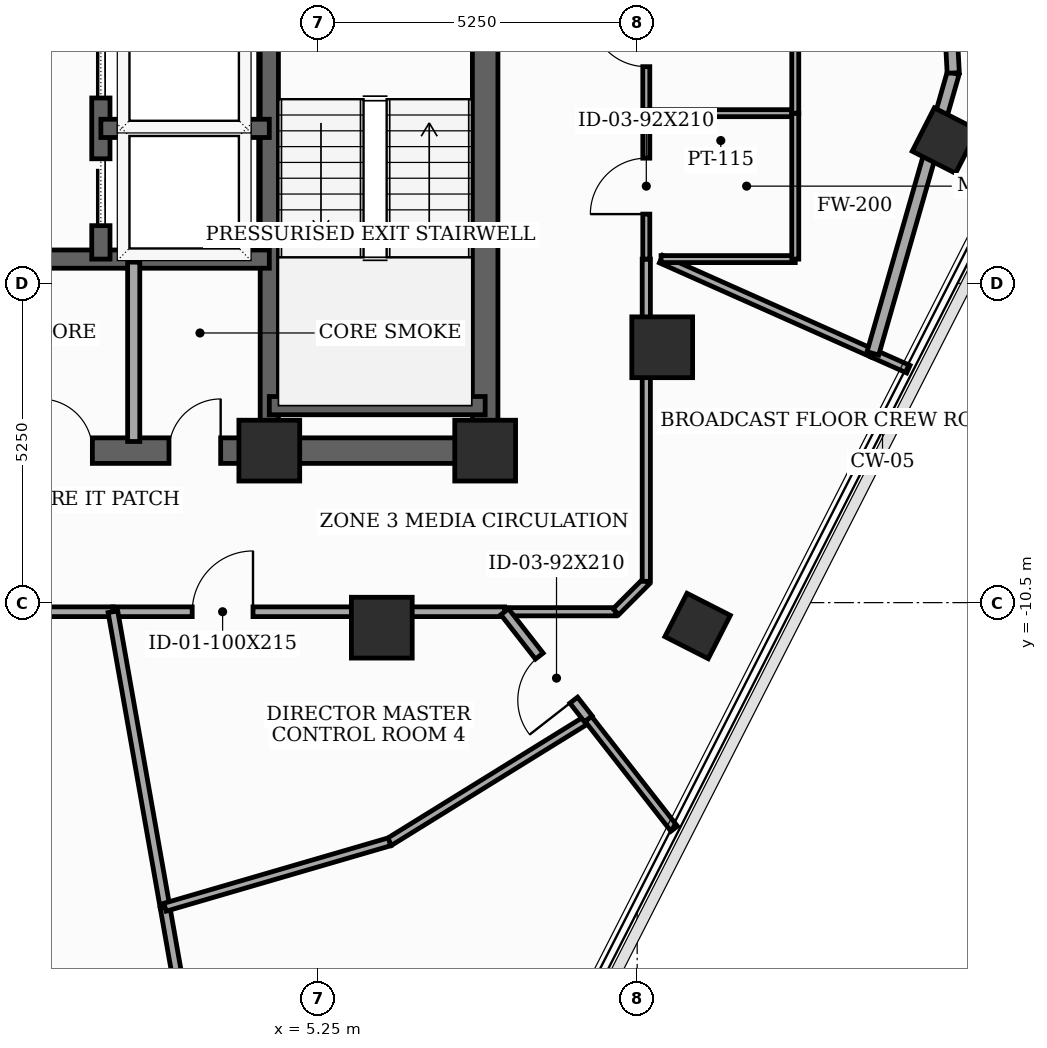
"""IFC4 building model, lengths in metres.
Left out: names, types, materials, properties, quantities, classifications, styles, units other than length and angle.
Written with IfcOpenShell. Run it as: python <this file> out.ifc"""

import sys

from ifc_helpers import new_model, si_unit, direction, frame, frame_2d, origin, origin_2d, place, context, subcontext, project, spatial, rectangle, extrude, element, fill, save


model = new_model("IFC4")
c1 = context("Model", 3, precision=1e-05, world=origin(), true_north=direction((0.0, 1.0)))
c2 = subcontext(c1, "Body", "Model", "MODEL_VIEW")
j1 = project(units=[si_unit("LENGTHUNIT", "METRE"), si_unit("PLANEANGLEUNIT", "RADIAN")], contexts=[c1])
p1 = place(None, origin())
s1 = spatial("IfcSite", under=j1, at=p1, CompositionType="ELEMENT")
p2 = place(p1, origin())
s2 = spatial("IfcBuilding", under=s1, at=p2, CompositionType="ELEMENT")
p3 = place(p2, frame((0.0, 0.0, 270.7)))
s3 = spatial("IfcBuildingStorey", under=s2, at=p3, CompositionType="ELEMENT", Elevation=270.7)
for number, where, z_axis, x_axis in (
    (1, (4.45, -8.0, 0.0), (0.0, 0.0, 1.0), (1.0, 0.0, 0.0)),
    (2, (8.0, -8.0, 0.0), (0.0, 0.0, 1.0), (1.0, 0.0, 0.0)),
    (3, (6.3, -10.912, 0.0), (0.0, 0.0, 1.0), (1.0, 0.0, 0.0)),
    (4, (10.912, -6.3, 0.0), (0.0, 0.0, 1.0), (1.0, 0.0, 0.0)),
):
    element("IfcColumn", number, at=place(p3, frame(where, z_axis=z_axis, x_axis=x_axis)), inside=s3, PredefinedType="COLUMN", context=c2, shape_type="SweptSolid", body=[
        extrude(rectangle(XDim=1.0, YDim=1.0, at=origin_2d()), origin(), (0.0, 0.0, 1.0), 3.7),
    ])
for number, where, z_axis, x_axis in (
    (5, (11.494, -10.885, 0.0), (0.0, 0.0, 1.0), (0.454, 0.891, 0.0)),
    (6, (15.562, -2.901, 0.0), (0.0, 0.0, 1.0), (0.454, 0.891, 0.0)),
):
    element("IfcColumn", number, at=place(p3, frame(where, z_axis=z_axis, x_axis=x_axis)), inside=s3, PredefinedType="COLUMN", context=c2, shape_type="SweptSolid", body=[
        extrude(rectangle(XDim=0.8, YDim=0.8, at=origin_2d()), origin(), (0.0, 0.0, 1.0), 3.7),
    ])
p4 = place(p3, frame((8.0, -8.0, 0.0), z_axis=(0.0, 0.0, 1.0), x_axis=(0.0, 1.0, 0.0)))
e7 = element("IfcWall", 7, at=p4, inside=s3, PredefinedType="SHEAR", context=c2, shape_type="SweptSolid", body=[
    extrude(rectangle(XDim=16.0, YDim=0.42, at=frame_2d((8.0, 0.0))), origin(), (0.0, 0.0, 1.0), 3.5),
])
p5 = place(p4, frame((9.6, 0.0, 0.0)))
e8 = element("IfcOpeningElement", 8, at=p5, cuts=e7, PredefinedType="OPENING", context=c2, shape_type="SweptSolid", body=[
    extrude(rectangle(XDim=1.05, YDim=2.15, at=frame_2d((0.525, 1.075))), frame((0.0, 0.22, 0.0), z_axis=(0.0, -1.0, 0.0), x_axis=(1.0, 0.0, 0.0)), (0.0, 0.0, 1.0), 0.44),
])
p6 = place(p4, frame((14.469, 0.0, 0.0)))
e9 = element("IfcOpeningElement", 9, at=p6, cuts=e7, PredefinedType="OPENING", context=c2, shape_type="SweptSolid", body=[
    extrude(rectangle(XDim=0.85, YDim=2.02, at=frame_2d((0.425, 1.01))), frame((0.0, 0.22, 0.0), z_axis=(0.0, -1.0, 0.0), x_axis=(1.0, 0.0, 0.0)), (0.0, 0.0, 1.0), 0.44),
])
p7 = place(p3, frame((-8.0, -8.0, 0.0), z_axis=(0.0, 0.0, 1.0), x_axis=(1.0, 0.0, 0.0)))
e10 = element("IfcWall", 10, at=p7, inside=s3, PredefinedType="SHEAR", context=c2, shape_type="SweptSolid", body=[
    extrude(rectangle(XDim=16.0, YDim=0.42, at=frame_2d((8.0, 0.0))), origin(), (0.0, 0.0, 1.0), 3.5),
])
p8 = place(p7, frame((4.35, 0.0, 0.0)))
e11 = element("IfcOpeningElement", 11, at=p8, cuts=e10, PredefinedType="OPENING", context=c2, shape_type="SweptSolid", body=[
    extrude(rectangle(XDim=0.85, YDim=2.02, at=frame_2d((0.425, 1.01))), frame((0.0, 0.22, 0.0), z_axis=(0.0, -1.0, 0.0), x_axis=(1.0, 0.0, 0.0)), (0.0, 0.0, 1.0), 0.44),
])
p9 = place(p7, frame((6.49, 0.0, 0.0)))
e12 = element("IfcOpeningElement", 12, at=p9, cuts=e10, PredefinedType="OPENING", context=c2, shape_type="SweptSolid", body=[
    extrude(rectangle(XDim=0.85, YDim=2.02, at=frame_2d((0.425, 1.01))), frame((0.0, 0.22, 0.0), z_axis=(0.0, -1.0, 0.0), x_axis=(1.0, 0.0, 0.0)), (0.0, 0.0, 1.0), 0.44),
])
p10 = place(p7, frame((8.69, 0.0, 0.0)))
e13 = element("IfcOpeningElement", 13, at=p10, cuts=e10, PredefinedType="OPENING", context=c2, shape_type="SweptSolid", body=[
    extrude(rectangle(XDim=0.85, YDim=2.02, at=frame_2d((0.425, 1.01))), frame((0.0, 0.22, 0.0), z_axis=(0.0, -1.0, 0.0), x_axis=(1.0, 0.0, 0.0)), (0.0, 0.0, 1.0), 0.44),
])
p11 = place(p7, frame((10.8, 0.0, 0.0)))
e14 = element("IfcOpeningElement", 14, at=p11, cuts=e10, PredefinedType="OPENING", context=c2, shape_type="SweptSolid", body=[
    extrude(rectangle(XDim=0.85, YDim=2.02, at=frame_2d((0.425, 1.01))), frame((0.0, 0.22, 0.0), z_axis=(0.0, -1.0, 0.0), x_axis=(1.0, 0.0, 0.0)), (0.0, 0.0, 1.0), 0.44),
])
p12 = place(p3, frame((4.45, -7.79, 0.0), z_axis=(0.0, 0.0, 1.0), x_axis=(0.0, 1.0, 0.0)))
e15 = element("IfcWall", 15, at=p12, inside=s3, PredefinedType="SHEAR", context=c2, shape_type="SweptSolid", body=[
    extrude(rectangle(XDim=15.58, YDim=0.3, at=frame_2d((7.79, 0.0))), origin(), (0.0, 0.0, 1.0), 3.5),
])
p13 = place(p3, frame((4.45, -7.26, 0.0), z_axis=(0.0, 0.0, 1.0), x_axis=(1.0, 0.0, 0.0)))
e16 = element("IfcWall", 16, at=p13, inside=s3, PredefinedType="SHEAR", context=c2, shape_type="SweptSolid", body=[
    extrude(rectangle(XDim=3.55, YDim=0.3, at=frame_2d((1.775, 0.0))), origin(), (0.0, 0.0, 1.0), 3.5),
])
p14 = place(p3, frame((-4.45, -4.85, 0.0), z_axis=(0.0, 0.0, 1.0), x_axis=(1.0, 0.0, 0.0)))
e17 = element("IfcWall", 17, at=p14, inside=s3, PredefinedType="SHEAR", context=c2, shape_type="SweptSolid", body=[
    extrude(rectangle(XDim=8.9, YDim=0.3, at=frame_2d((4.45, 0.0))), origin(), (0.0, 0.0, 1.0), 3.5),
])
p15 = place(p3, frame((1.68, -4.85, 0.0), z_axis=(0.0, 0.0, 1.0), x_axis=(0.0, 1.0, 0.0)))
e18 = element("IfcWall", 18, at=p15, inside=s3, PredefinedType="SHEAR", context=c2, shape_type="SweptSolid", body=[
    extrude(rectangle(XDim=12.64, YDim=0.3, at=frame_2d((6.32, 0.0))), origin(), (0.0, 0.0, 1.0), 3.5),
])
p16 = place(p15, frame((0.55, 0.0, 0.0)))
e19 = element("IfcOpeningElement", 19, at=p16, cuts=e18, PredefinedType="OPENING", context=c2, shape_type="SweptSolid", body=[
    extrude(rectangle(XDim=1.1, YDim=2.1, at=frame_2d((0.55, 1.05))), frame((0.0, 0.16, 0.0), z_axis=(0.0, -1.0, 0.0), x_axis=(1.0, 0.0, 0.0)), (0.0, 0.0, 1.0), 0.32),
])
p17 = place(p15, frame((2.65, 0.0, 0.0)))
e20 = element("IfcOpeningElement", 20, at=p17, cuts=e18, PredefinedType="OPENING", context=c2, shape_type="SweptSolid", body=[
    extrude(rectangle(XDim=1.1, YDim=2.1, at=frame_2d((0.55, 1.05))), frame((0.0, 0.16, 0.0), z_axis=(0.0, -1.0, 0.0), x_axis=(1.0, 0.0, 0.0)), (0.0, 0.0, 1.0), 0.32),
])
p18 = place(p15, frame((4.75, 0.0, 0.0)))
e21 = element("IfcOpeningElement", 21, at=p18, cuts=e18, PredefinedType="OPENING", context=c2, shape_type="SweptSolid", body=[
    extrude(rectangle(XDim=1.1, YDim=2.1, at=frame_2d((0.55, 1.05))), frame((0.0, 0.16, 0.0), z_axis=(0.0, -1.0, 0.0), x_axis=(1.0, 0.0, 0.0)), (0.0, 0.0, 1.0), 0.32),
])
p19 = place(p15, frame((8.9, 0.0, 0.0)))
e22 = element("IfcOpeningElement", 22, at=p19, cuts=e18, PredefinedType="OPENING", context=c2, shape_type="SweptSolid", body=[
    extrude(rectangle(XDim=0.95, YDim=2.1, at=frame_2d((0.475, 1.05))), frame((0.0, 0.16, 0.0), z_axis=(0.0, -1.0, 0.0), x_axis=(1.0, 0.0, 0.0)), (0.0, 0.0, 1.0), 0.32),
])
p20 = place(p3, frame((1.68, -2.7, 0.0), z_axis=(0.0, 0.0, 1.0), x_axis=(1.0, 0.0, 0.0)))
e23 = element("IfcWall", 23, at=p20, inside=s3, PredefinedType="SHEAR", context=c2, shape_type="SweptSolid", body=[
    extrude(rectangle(XDim=2.77, YDim=0.3, at=frame_2d((1.385, 0.0))), origin(), (0.0, 0.0, 1.0), 3.5),
])
p21 = place(p3, frame((2.22, -7.85, 0.0), z_axis=(0.0, 0.0, 1.0), x_axis=(0.0, 1.0, 0.0)))
e24 = element("IfcWall", 24, at=p21, inside=s3, PredefinedType="SOLIDWALL", context=c2, shape_type="SweptSolid", body=[
    extrude(rectangle(XDim=2.95, YDim=0.2, at=frame_2d((1.475, 0.0))), origin(), (0.0, 0.0, 1.0), 2.885),
])
p22 = place(p3, frame((-5.663, -10.65, 0.0), z_axis=(0.0, 0.0, 1.0), x_axis=(1.0, 0.0, 0.0)))
e25 = element("IfcWall", 25, at=p22, inside=s3, PredefinedType="PARTITIONING", context=c2, shape_type="SweptSolid", body=[
    extrude(rectangle(XDim=7.541, YDim=0.16, at=frame_2d((3.771, 0.0))), origin(), (0.0, 0.0, 1.0), 2.885),
])
p23 = place(p22, frame((3.271, 0.0, 0.0)))
e26 = element("IfcOpeningElement", 26, at=p23, cuts=e25, PredefinedType="OPENING", context=c2, shape_type="SweptSolid", body=[
    extrude(rectangle(XDim=1.0, YDim=2.15, at=frame_2d((0.5, 1.075))), frame((0.0, 0.09, 0.0), z_axis=(0.0, -1.0, 0.0), x_axis=(1.0, 0.0, 0.0)), (0.0, 0.0, 1.0), 0.18),
])
p24 = place(p3, frame((1.878, -10.65, 0.0), z_axis=(0.0, 0.0, 1.0), x_axis=(1.0, 0.0, 0.0)))
e27 = element("IfcWall", 27, at=p24, inside=s3, PredefinedType="PARTITIONING", context=c2, shape_type="SweptSolid", body=[
    extrude(rectangle(XDim=6.443, YDim=0.16, at=frame_2d((3.222, 0.0))), origin(), (0.0, 0.0, 1.0), 2.885),
])
p25 = place(p24, frame((1.304, 0.0, 0.0)))
e28 = element("IfcOpeningElement", 28, at=p25, cuts=e27, PredefinedType="OPENING", context=c2, shape_type="SweptSolid", body=[
    extrude(rectangle(XDim=1.0, YDim=2.15, at=frame_2d((0.5, 1.075))), frame((0.0, 0.09, 0.0), z_axis=(0.0, -1.0, 0.0), x_axis=(1.0, 0.0, 0.0)), (0.0, 0.0, 1.0), 0.18),
])
p26 = place(p3, frame((8.321, -10.65, 0.0), z_axis=(0.0, 0.0, 1.0), x_axis=(1.0, 0.0, 0.0)))
e29 = element("IfcWall", 29, at=p26, inside=s3, PredefinedType="PARTITIONING", context=c2, shape_type="SweptSolid", body=[
    extrude(rectangle(XDim=1.829, YDim=0.135, at=frame_2d((0.915, 0.0))), origin(), (0.0, 0.0, 1.0), 3.5),
])
p27 = place(p3, frame((10.15, -10.65, 0.0), z_axis=(0.0, 0.0, 1.0), x_axis=(0.707106781187, 0.707106781187, 0.0)))
e30 = element("IfcWall", 30, at=p27, inside=s3, PredefinedType="PARTITIONING", context=c2, shape_type="SweptSolid", body=[
    extrude(rectangle(XDim=0.707, YDim=0.135, at=frame_2d((0.354, 0.0))), origin(), (0.0, 0.0, 1.0), 3.5),
])
p28 = place(p3, frame((10.65, -10.15, 0.0), z_axis=(0.0, 0.0, 1.0), x_axis=(0.0, 1.0, 0.0)))
e31 = element("IfcWall", 31, at=p28, inside=s3, PredefinedType="PARTITIONING", context=c2, shape_type="SweptSolid", body=[
    extrude(rectangle(XDim=5.3, YDim=0.135, at=frame_2d((2.65, 0.0))), origin(), (0.0, 0.0, 1.0), 2.885),
])
p29 = place(p3, frame((10.65, -4.85, 0.0), z_axis=(0.0, 0.0, 1.0), x_axis=(0.0, 1.0, 0.0)))
e32 = element("IfcWall", 32, at=p29, inside=s3, PredefinedType="PARTITIONING", context=c2, shape_type="SweptSolid", body=[
    extrude(rectangle(XDim=2.4, YDim=0.115, at=frame_2d((1.2, 0.0))), origin(), (0.0, 0.0, 1.0), 3.5),
])
p30 = place(p29, frame((0.74, 0.0, 0.0)))
e33 = element("IfcOpeningElement", 33, at=p30, cuts=e32, PredefinedType="OPENING", context=c2, shape_type="SweptSolid", body=[
    extrude(rectangle(XDim=0.92, YDim=2.1, at=frame_2d((0.46, 1.05))), frame((0.0, 0.067, 0.0), z_axis=(0.0, -1.0, 0.0), x_axis=(1.0, 0.0, 0.0)), (0.0, 0.0, 1.0), 0.135),
])
p31 = place(p3, frame((10.65, -2.45, 0.0), z_axis=(0.0, 0.0, 1.0), x_axis=(0.0, 1.0, 0.0)))
e34 = element("IfcWall", 34, at=p31, inside=s3, PredefinedType="PARTITIONING", context=c2, shape_type="SweptSolid", body=[
    extrude(rectangle(XDim=2.45, YDim=0.115, at=frame_2d((1.225, 0.0))), origin(), (0.0, 0.0, 1.0), 2.885),
])
p32 = place(p31, frame((0.765, 0.0, 0.0)))
e35 = element("IfcOpeningElement", 35, at=p32, cuts=e34, PredefinedType="OPENING", context=c2, shape_type="SweptSolid", body=[
    extrude(rectangle(XDim=0.92, YDim=2.1, at=frame_2d((0.46, 1.05))), frame((0.0, 0.067, 0.0), z_axis=(0.0, -1.0, 0.0), x_axis=(1.0, 0.0, 0.0)), (0.0, 0.0, 1.0), 0.135),
])
p33 = place(p3, frame((4.719, -26.759, 0.0), z_axis=(0.0, 0.0, 1.0), x_axis=(-0.173635361328, 0.984810012793, 0.0)))
e36 = element("IfcWall", 36, at=p33, inside=s3, PredefinedType="PARTITIONING", context=c2, shape_type="SweptSolid", body=[
    extrude(rectangle(XDim=11.423, YDim=0.16, at=frame_2d((5.711, 0.0))), origin(), (0.0, 0.0, 1.0), 3.035),
])
p34 = place(p33, frame((5.251, 0.0, 0.0)))
e37 = element("IfcOpeningElement", 37, at=p34, cuts=e36, PredefinedType="OPENING", context=c2, shape_type="SweptSolid", body=[
    extrude(rectangle(XDim=0.92, YDim=2.1, at=frame_2d((0.46, 1.05))), frame((0.0, 0.09, 0.0), z_axis=(0.0, -1.0, 0.0), x_axis=(1.0, 0.0, 0.0)), (0.0, 0.0, 1.0), 0.18),
])
p35 = place(p3, frame((2.735, -15.51, 0.0), z_axis=(0.0, 0.0, 1.0), x_axis=(-0.173689381088, 0.984800486849, 0.0)))
e38 = element("IfcWall", 38, at=p35, inside=s3, PredefinedType="PARTITIONING", context=c2, shape_type="SweptSolid", body=[
    extrude(rectangle(XDim=4.935, YDim=0.16, at=frame_2d((2.468, 0.0))), origin(), (0.0, 0.0, 1.0), 2.885),
])
p36 = place(p3, frame((9.696, -12.411, 0.0), z_axis=(0.0, 0.0, 1.0), x_axis=(-0.850393663863, -0.526146953295, 0.0)))
e39 = element("IfcWall", 39, at=p36, inside=s3, PredefinedType="PARTITIONING", context=c2, shape_type="SweptSolid", body=[
    extrude(rectangle(XDim=3.845, YDim=0.135, at=frame_2d((1.923, 0.0))), origin(), (0.0, 0.0, 1.0), 3.035),
])
p37 = place(p3, frame((6.426, -14.434, 0.0), z_axis=(0.0, 0.0, 1.0), x_axis=(-0.960041241254, -0.279858562654, 0.0)))
e40 = element("IfcWall", 40, at=p37, inside=s3, PredefinedType="PARTITIONING", context=c2, shape_type="SweptSolid", body=[
    extrude(rectangle(XDim=3.844, YDim=0.135, at=frame_2d((1.922, 0.0))), origin(), (0.0, 0.0, 1.0), 3.185),
])
p38 = place(p3, frame((11.108, -14.218, 0.0), z_axis=(0.0, 0.0, 1.0), x_axis=(-0.615736984334, 0.787951753677, 0.0)))
e41 = element("IfcWall", 41, at=p38, inside=s3, PredefinedType="PARTITIONING", context=c2, shape_type="SweptSolid", body=[
    extrude(rectangle(XDim=2.294, YDim=0.135, at=frame_2d((1.147, 0.0))), origin(), (0.0, 0.0, 1.0), 3.035),
])
p39 = place(p3, frame((9.696, -12.411, 0.0), z_axis=(0.0, 0.0, 1.0), x_axis=(-0.615429845305, 0.788191668002, 0.0)))
e42 = element("IfcWall", 42, at=p39, inside=s3, PredefinedType="PARTITIONING", context=c2, shape_type="SweptSolid", body=[
    extrude(rectangle(XDim=2.234, YDim=0.16, at=frame_2d((1.117, 0.0))), origin(), (0.0, 0.0, 1.0), 3.5),
])
p40 = place(p39, frame((0.389, 0.0, 0.0)))
e43 = element("IfcOpeningElement", 43, at=p40, cuts=e42, PredefinedType="OPENING", context=c2, shape_type="SweptSolid", body=[
    extrude(rectangle(XDim=0.92, YDim=2.1, at=frame_2d((0.46, 1.05))), frame((0.0, 0.09, 0.0), z_axis=(0.0, -1.0, 0.0), x_axis=(1.0, 0.0, 0.0)), (0.0, 0.0, 1.0), 0.18),
])
p41 = place(p3, frame((14.376, -6.401, 0.0), z_axis=(0.0, 0.0, 1.0), x_axis=(-0.913536711347, 0.406756287009, 0.0)))
e44 = element("IfcWall", 44, at=p41, inside=s3, PredefinedType="PARTITIONING", context=c2, shape_type="SweptSolid", body=[
    extrude(rectangle(XDim=3.812, YDim=0.135, at=frame_2d((1.906, 0.0))), origin(), (0.0, 0.0, 1.0), 2.885),
])
p42 = place(p3, frame((14.959, -6.66, 0.0), z_axis=(0.0, 0.0, 1.0), x_axis=(-0.913843080804, 0.406067511219, 0.0)))
e45 = element("IfcWall", 45, at=p42, inside=s3, PredefinedType="PARTITIONING", context=c2, shape_type="SweptSolid", body=[
    extrude(rectangle(XDim=0.638, YDim=0.135, at=frame_2d((0.319, 0.0))), origin(), (0.0, 0.0, 1.0), 3.5),
])
p43 = place(p3, frame((13.1, -2.45, 0.0), z_axis=(0.0, 0.0, 1.0), x_axis=(-1.0, 0.0, 0.0)))
e46 = element("IfcWall", 46, at=p43, inside=s3, PredefinedType="PARTITIONING", context=c2, shape_type="SweptSolid", body=[
    extrude(rectangle(XDim=2.45, YDim=0.115, at=frame_2d((1.225, 0.0))), origin(), (0.0, 0.0, 1.0), 2.885),
])
p44 = place(p3, frame((10.893, -4.85, 0.0), z_axis=(0.0, 0.0, 1.0), x_axis=(1.0, 0.0, 0.0)))
e47 = element("IfcWall", 47, at=p44, inside=s3, PredefinedType="PARTITIONING", context=c2, shape_type="SweptSolid", body=[
    extrude(rectangle(XDim=2.207, YDim=0.115, at=frame_2d((1.104, 0.0))), origin(), (0.0, 0.0, 1.0), 2.885),
])
p45 = place(p3, frame((13.1, -4.85, 0.0), z_axis=(0.0, 0.0, 1.0), x_axis=(0.0, 1.0, 0.0)))
e48 = element("IfcWall", 48, at=p45, inside=s3, PredefinedType="PARTITIONING", context=c2, shape_type="SweptSolid", body=[
    extrude(rectangle(XDim=2.4, YDim=0.115, at=frame_2d((1.2, 0.0))), origin(), (0.0, 0.0, 1.0), 3.5),
])
p46 = place(p3, frame((13.1, -2.45, 0.0), z_axis=(0.0, 0.0, 1.0), x_axis=(0.0, 1.0, 0.0)))
e49 = element("IfcWall", 49, at=p46, inside=s3, PredefinedType="PARTITIONING", context=c2, shape_type="SweptSolid", body=[
    extrude(rectangle(XDim=2.45, YDim=0.115, at=frame_2d((1.225, 0.0))), origin(), (0.0, 0.0, 1.0), 3.035),
])
p47 = place(p3, frame((14.376, -6.401, 0.0), z_axis=(0.0, 0.0, 1.0), x_axis=(0.275561163163, 0.961283540562, 0.0)))
e50 = element("IfcWall", 50, at=p47, inside=s3, PredefinedType="SOLIDWALL", context=c2, shape_type="SweptSolid", body=[
    extrude(rectangle(XDim=4.798, YDim=0.2, at=frame_2d((2.399, 0.0))), origin(), (0.0, 0.0, 1.0), 3.035),
])
p48 = place(p3, frame((15.698, -1.789, 0.0), z_axis=(0.0, 0.0, 1.0), x_axis=(-0.052327910164, 0.998629956399, 0.0)))
e51 = element("IfcWall", 51, at=p48, inside=s3, PredefinedType="SOLIDWALL", context=c2, shape_type="SweptSolid", body=[
    extrude(rectangle(XDim=5.216, YDim=0.2, at=frame_2d((2.608, 0.0))), origin(), (0.0, 0.0, 1.0), 3.035),
])
p49 = place(p10, origin())
e52 = element("IfcDoor", 52, at=p49, inside=s3, OperationType="SINGLE_SWING_LEFT", PredefinedType="TRAPDOOR", context=c2, shape_type="SweptSolid", body=[
    extrude(rectangle(XDim=0.85, YDim=2.02, at=frame_2d((0.425, 1.01))), frame((0.0, 0.025, 0.0), z_axis=(0.0, -1.0, 0.0), x_axis=(1.0, 0.0, 0.0)), (0.0, 0.0, 1.0), 0.05),
])
fill(e13, e52)
p50 = place(p11, origin())
e53 = element("IfcDoor", 53, at=p50, inside=s3, OperationType="SINGLE_SWING_RIGHT", PredefinedType="TRAPDOOR", context=c2, shape_type="SweptSolid", body=[
    extrude(rectangle(XDim=0.85, YDim=2.02, at=frame_2d((0.425, 1.01))), frame((0.0, 0.025, 0.0), z_axis=(0.0, -1.0, 0.0), x_axis=(1.0, 0.0, 0.0)), (0.0, 0.0, 1.0), 0.05),
])
fill(e14, e53)
p51 = place(p16, origin())
e54 = element("IfcDoor", 54, at=p51, inside=s3, OperationType="SLIDING_TO_LEFT", PredefinedType="DOOR", context=c2, shape_type="SweptSolid", body=[
    extrude(rectangle(XDim=1.1, YDim=2.1, at=frame_2d((0.55, 1.05))), frame((0.0, 0.025, 0.0), z_axis=(0.0, -1.0, 0.0), x_axis=(1.0, 0.0, 0.0)), (0.0, 0.0, 1.0), 0.05),
])
fill(e19, e54)
p52 = place(p17, origin())
e55 = element("IfcDoor", 55, at=p52, inside=s3, OperationType="SLIDING_TO_LEFT", PredefinedType="DOOR", context=c2, shape_type="SweptSolid", body=[
    extrude(rectangle(XDim=1.1, YDim=2.1, at=frame_2d((0.55, 1.05))), frame((0.0, 0.025, 0.0), z_axis=(0.0, -1.0, 0.0), x_axis=(1.0, 0.0, 0.0)), (0.0, 0.0, 1.0), 0.05),
])
fill(e20, e55)
p53 = place(p25, origin())
e56 = element("IfcDoor", 56, at=p53, inside=s3, OperationType="SINGLE_SWING_RIGHT", PredefinedType="DOOR", context=c2, shape_type="SweptSolid", body=[
    extrude(rectangle(XDim=1.0, YDim=2.15, at=frame_2d((0.5, 1.075))), frame((0.0, 0.025, 0.0), z_axis=(0.0, -1.0, 0.0), x_axis=(1.0, 0.0, 0.0)), (0.0, 0.0, 1.0), 0.05),
])
fill(e28, e56)
p54 = place(p30, origin())
e57 = element("IfcDoor", 57, at=p54, inside=s3, OperationType="SINGLE_SWING_LEFT", PredefinedType="DOOR", context=c2, shape_type="SweptSolid", body=[
    extrude(rectangle(XDim=0.92, YDim=2.1, at=frame_2d((0.46, 1.05))), frame((0.0, 0.025, 0.0), z_axis=(0.0, -1.0, 0.0), x_axis=(1.0, 0.0, 0.0)), (0.0, 0.0, 1.0), 0.05),
])
fill(e33, e57)
p55 = place(p32, origin())
e58 = element("IfcDoor", 58, at=p55, inside=s3, OperationType="SINGLE_SWING_RIGHT", PredefinedType="DOOR", context=c2, shape_type="SweptSolid", body=[
    extrude(rectangle(XDim=0.92, YDim=2.1, at=frame_2d((0.46, 1.05))), frame((0.0, 0.025, 0.0), z_axis=(0.0, -1.0, 0.0), x_axis=(1.0, 0.0, 0.0)), (0.0, 0.0, 1.0), 0.05),
])
fill(e35, e58)
p56 = place(p40, origin())
e59 = element("IfcDoor", 59, at=p56, inside=s3, OperationType="SINGLE_SWING_LEFT", PredefinedType="DOOR", context=c2, shape_type="SweptSolid", body=[
    extrude(rectangle(XDim=0.92, YDim=2.1, at=frame_2d((0.46, 1.05))), frame((0.0, 0.025, 0.0), z_axis=(0.0, -1.0, 0.0), x_axis=(1.0, 0.0, 0.0)), (0.0, 0.0, 1.0), 0.05),
])
fill(e43, e59)
save(model, sys.argv[1])
